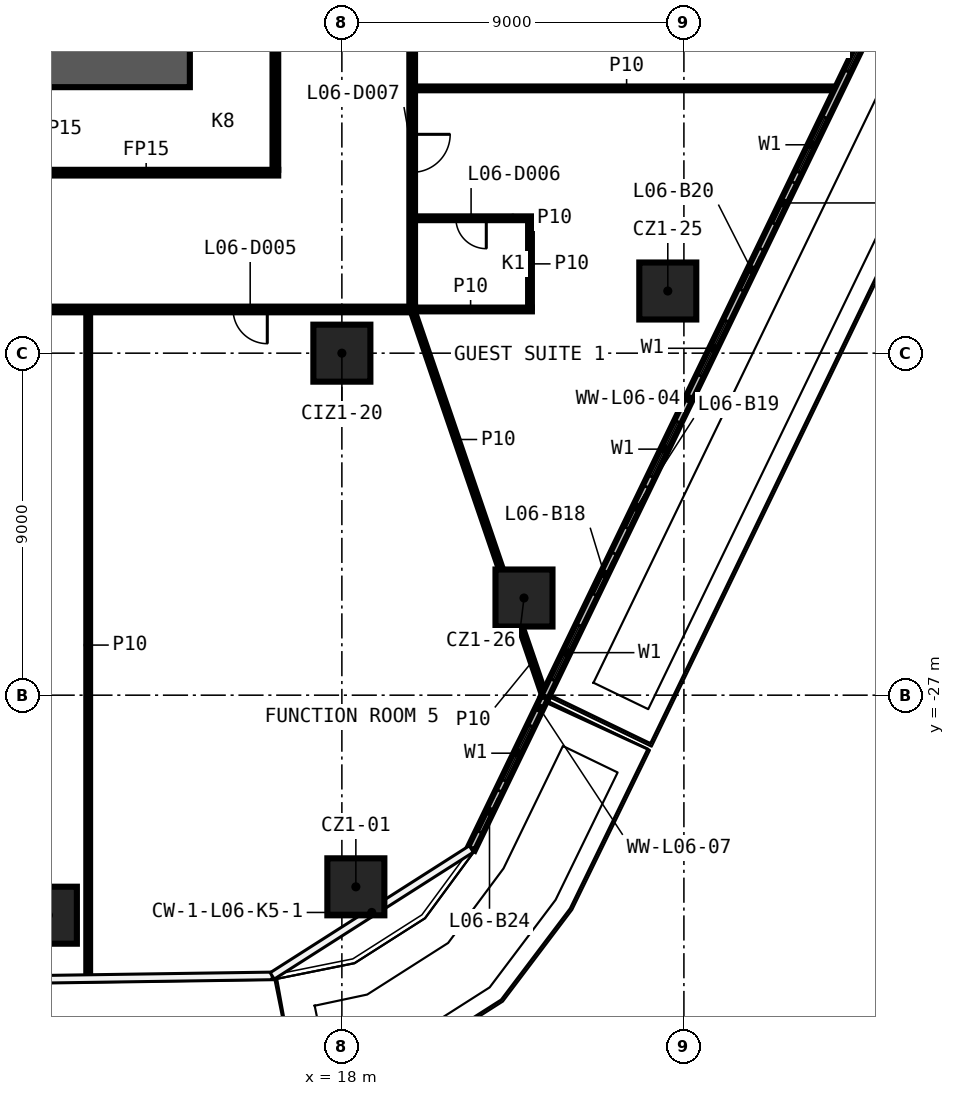
"""IFC4 building model, lengths in metres.
Left out: names, types, materials, properties, quantities, classifications, styles, units other than length and angle.
Written with IfcOpenShell. Run it as: python <this file> out.ifc"""

import sys

from ifc_helpers import new_model, si_unit, direction, frame, frame_2d, origin, origin_2d, place, context, subcontext, project, spatial, rectangle, extrude, element, fill, save


model = new_model("IFC4")
c1 = context("Model", 3, precision=1e-05, world=origin(), true_north=direction((0.0, 1.0)))
c2 = subcontext(c1, "Body", "Model", "MODEL_VIEW")
j1 = project(units=[si_unit("LENGTHUNIT", "METRE"), si_unit("PLANEANGLEUNIT", "RADIAN")], contexts=[c1])
p1 = place(None, origin())
s1 = spatial("IfcSite", under=j1, at=p1, CompositionType="ELEMENT")
p2 = place(p1, origin())
s2 = spatial("IfcBuilding", under=s1, at=p2, CompositionType="ELEMENT")
p3 = place(p2, frame((0.0, 0.0, 44.0)))
s3 = spatial("IfcBuildingStorey", under=s2, at=p3, CompositionType="ELEMENT", Elevation=44.0)
for number, where, z_axis, x_axis in (
    (1, (18.368, -32.043, 0.0), (0.0, 0.0, 1.0), (1.0, 0.0, 0.0)),
    (2, (10.277, -32.79, 0.0), (0.0, 0.0, 1.0), (1.0, 0.0, 0.0)),
    (3, (26.576, -16.364, 0.0), (0.0, 0.0, 1.0), (1.0, 0.0, 0.0)),
    (4, (22.792, -24.443, 0.0), (0.0, 0.0, 1.0), (1.0, 0.0, 0.0)),
    (5, (18.0, -18.0, 0.0), (0.0, 0.0, 1.0), (1.0, 0.0, 0.0)),
):
    element("IfcColumn", number, at=place(p3, frame(where, z_axis=z_axis, x_axis=x_axis)), inside=s3, PredefinedType="COLUMN", context=c2, shape_type="SweptSolid", body=[
        extrude(rectangle(XDim=1.5, YDim=1.5, at=origin_2d()), origin(), (0.0, 0.0, 1.0), 3.3),
    ])
p4 = place(p3, frame((19.925, -16.85, 0.0), z_axis=(0.0, 0.0, 1.0), x_axis=(-1.0, 0.0, 0.0)))
e6 = element("IfcWall", 6, at=p4, inside=s3, PredefinedType="PARTITIONING", context=c2, shape_type="SweptSolid", body=[
    extrude(rectangle(XDim=39.85, YDim=0.15, at=frame_2d((19.925, 0.0))), origin(), (0.0, 0.0, 1.0), 3.3),
])
p5 = place(p4, frame((31.008, 0.0, 0.0)))
e7 = element("IfcOpeningElement", 7, at=p5, cuts=e6, PredefinedType="OPENING", context=c2, shape_type="SweptSolid", body=[
    extrude(rectangle(XDim=0.9, YDim=2.1, at=frame_2d((0.45, 1.05))), frame((0.0, 0.085, 0.0), z_axis=(0.0, -1.0, 0.0), x_axis=(1.0, 0.0, 0.0)), (0.0, 0.0, 1.0), 0.17),
])
p6 = place(p4, frame((22.704, 0.0, 0.0)))
e8 = element("IfcOpeningElement", 8, at=p6, cuts=e6, PredefinedType="OPENING", context=c2, shape_type="SweptSolid", body=[
    extrude(rectangle(XDim=0.9, YDim=2.1, at=frame_2d((0.45, 1.05))), frame((0.0, 0.085, 0.0), z_axis=(0.0, -1.0, 0.0), x_axis=(1.0, 0.0, 0.0)), (0.0, 0.0, 1.0), 0.17),
])
p7 = place(p4, frame((3.888, 0.0, 0.0)))
e9 = element("IfcOpeningElement", 9, at=p7, cuts=e6, PredefinedType="OPENING", context=c2, shape_type="SweptSolid", body=[
    extrude(rectangle(XDim=0.9, YDim=2.1, at=frame_2d((0.45, 1.05))), frame((0.0, 0.085, 0.0), z_axis=(0.0, -1.0, 0.0), x_axis=(1.0, 0.0, 0.0)), (0.0, 0.0, 1.0), 0.17),
])
p8 = place(p3, frame((19.775, -16.85, 0.0), z_axis=(0.0, 0.0, 1.0), x_axis=(1.0, 0.0, 0.0)))
e10 = element("IfcWall", 10, at=p8, inside=s3, PredefinedType="PARTITIONING", context=c2, shape_type="SweptSolid", body=[
    extrude(rectangle(XDim=3.225, YDim=0.1, at=frame_2d((1.613, 0.0))), origin(), (0.0, 0.0, 1.0), 3.3),
])
p9 = place(p3, frame((23.0, -14.45, 0.0), z_axis=(0.0, 0.0, 1.0), x_axis=(-1.0, 0.0, 0.0)))
e11 = element("IfcWall", 11, at=p9, inside=s3, PredefinedType="PARTITIONING", context=c2, shape_type="SweptSolid", body=[
    extrude(rectangle(XDim=3.075, YDim=0.1, at=frame_2d((1.538, 0.0))), origin(), (0.0, 0.0, 1.0), 3.3),
])
p10 = place(p9, frame((1.2, 0.0, 0.0)))
e12 = element("IfcOpeningElement", 12, at=p10, cuts=e11, PredefinedType="OPENING", context=c2, shape_type="SweptSolid", body=[
    extrude(rectangle(XDim=0.8, YDim=2.1, at=frame_2d((0.4, 1.05))), frame((0.0, 0.06, 0.0), z_axis=(0.0, -1.0, 0.0), x_axis=(1.0, 0.0, 0.0)), (0.0, 0.0, 1.0), 0.12),
])
p11 = place(p3, frame((9.375, -13.25, 0.0), z_axis=(0.0, 0.0, 1.0), x_axis=(1.0, 0.0, 0.0)))
e13 = element("IfcWall", 13, at=p11, inside=s3, PredefinedType="PARTITIONING", context=c2, shape_type="SweptSolid", body=[
    extrude(rectangle(XDim=6.95, YDim=0.15, at=frame_2d((3.475, 0.0))), origin(), (0.0, 0.0, 1.0), 3.3),
])
p12 = place(p3, frame((19.925, -11.032, 0.0), z_axis=(0.0, 0.0, 1.0), x_axis=(1.0, 0.0, 0.0)))
e14 = element("IfcWall", 14, at=p12, inside=s3, PredefinedType="PARTITIONING", context=c2, shape_type="SweptSolid", body=[
    extrude(rectangle(XDim=11.135, YDim=0.1, at=frame_2d((5.567, 0.0))), origin(), (0.0, 0.0, 1.0), 3.3),
])
p13 = place(p3, frame((22.95, -16.8, 0.0), z_axis=(0.0, 0.0, 1.0), x_axis=(0.0, 1.0, 0.0)))
e15 = element("IfcWall", 15, at=p13, inside=s3, PredefinedType="PARTITIONING", context=c2, shape_type="SweptSolid", body=[
    extrude(rectangle(XDim=2.3, YDim=0.1, at=frame_2d((1.15, 0.0))), origin(), (0.0, 0.0, 1.0), 3.3),
])
p14 = place(p3, frame((19.85, 16.775, 0.0), z_axis=(0.0, 0.0, 1.0), x_axis=(0.0, -1.0, 0.0)))
e16 = element("IfcWall", 16, at=p14, inside=s3, PredefinedType="PARTITIONING", context=c2, shape_type="SweptSolid", body=[
    extrude(rectangle(XDim=33.55, YDim=0.15, at=frame_2d((16.775, 0.0))), origin(), (0.0, 0.0, 1.0), 3.3),
])
p15 = place(p14, frame((29.016, 0.0, 0.0)))
e17 = element("IfcOpeningElement", 17, at=p15, cuts=e16, PredefinedType="OPENING", context=c2, shape_type="SweptSolid", body=[
    extrude(rectangle(XDim=1.0, YDim=2.1, at=frame_2d((0.5, 1.05))), frame((0.0, 0.085, 0.0), z_axis=(0.0, -1.0, 0.0), x_axis=(1.0, 0.0, 0.0)), (0.0, 0.0, 1.0), 0.17),
])
p16 = place(p14, frame((20.1, 0.0, 0.0)))
e18 = element("IfcOpeningElement", 18, at=p16, cuts=e16, PredefinedType="OPENING", context=c2, shape_type="SweptSolid", body=[
    extrude(rectangle(XDim=1.0, YDim=2.1, at=frame_2d((0.5, 1.05))), frame((0.0, 0.085, 0.0), z_axis=(0.0, -1.0, 0.0), x_axis=(1.0, 0.0, 0.0)), (0.0, 0.0, 1.0), 0.17),
])
p17 = place(p14, frame((18.446, 0.0, 0.0)))
e19 = element("IfcOpeningElement", 19, at=p17, cuts=e16, PredefinedType="OPENING", context=c2, shape_type="SweptSolid", body=[
    extrude(rectangle(XDim=1.0, YDim=2.1, at=frame_2d((0.5, 1.05))), frame((0.0, 0.085, 0.0), z_axis=(0.0, -1.0, 0.0), x_axis=(1.0, 0.0, 0.0)), (0.0, 0.0, 1.0), 0.17),
])
p18 = place(p14, frame((4.143, 0.0, 0.0)))
e20 = element("IfcOpeningElement", 20, at=p18, cuts=e16, PredefinedType="OPENING", context=c2, shape_type="SweptSolid", body=[
    extrude(rectangle(XDim=0.9, YDim=2.1, at=frame_2d((0.45, 1.05))), frame((0.0, 0.085, 0.0), z_axis=(0.0, -1.0, 0.0), x_axis=(1.0, 0.0, 0.0)), (0.0, 0.0, 1.0), 0.17),
])
p19 = place(p3, frame((16.25, -13.175, 0.0), z_axis=(0.0, 0.0, 1.0), x_axis=(0.0, 1.0, 0.0)))
e21 = element("IfcWall", 21, at=p19, inside=s3, PredefinedType="PARTITIONING", context=c2, shape_type="SweptSolid", body=[
    extrude(rectangle(XDim=26.35, YDim=0.15, at=frame_2d((13.175, 0.0))), origin(), (0.0, 0.0, 1.0), 3.3),
])
p20 = place(p19, frame((8.225, 0.0, 0.0)))
e22 = element("IfcOpeningElement", 22, at=p20, cuts=e21, PredefinedType="OPENING", context=c2, shape_type="SweptSolid", body=[
    extrude(rectangle(XDim=0.9, YDim=2.1, at=frame_2d((0.45, 1.05))), frame((0.0, 0.085, 0.0), z_axis=(0.0, -1.0, 0.0), x_axis=(1.0, 0.0, 0.0)), (0.0, 0.0, 1.0), 0.17),
])
p21 = place(p19, frame((17.225, 0.0, 0.0)))
e23 = element("IfcOpeningElement", 23, at=p21, cuts=e21, PredefinedType="OPENING", context=c2, shape_type="SweptSolid", body=[
    extrude(rectangle(XDim=0.9, YDim=2.1, at=frame_2d((0.45, 1.05))), frame((0.0, 0.085, 0.0), z_axis=(0.0, -1.0, 0.0), x_axis=(1.0, 0.0, 0.0)), (0.0, 0.0, 1.0), 0.17),
])
p22 = place(p3, frame((11.325, -34.438, 0.0), z_axis=(0.0, 0.0, 1.0), x_axis=(0.0, 1.0, 0.0)))
e24 = element("IfcWall", 24, at=p22, inside=s3, PredefinedType="PARTITIONING", context=c2, shape_type="SweptSolid", body=[
    extrude(rectangle(XDim=17.513, YDim=0.1, at=frame_2d((8.757, 0.0))), origin(), (0.0, 0.0, 1.0), 3.3),
])
p23 = place(p3, frame((19.85, -16.85, 0.0), z_axis=(0.0, 0.0, 1.0), x_axis=(0.323389409091, -0.94626597217, 0.0)))
e25 = element("IfcWall", 25, at=p23, inside=s3, PredefinedType="PARTITIONING", context=c2, shape_type="SweptSolid", body=[
    extrude(rectangle(XDim=7.232, YDim=0.1, at=frame_2d((3.616, 0.0))), origin(), (0.0, 0.0, 1.0), 3.3),
])
p24 = place(p3, frame((22.701, -25.193, 0.0), z_axis=(0.0, 0.0, 1.0), x_axis=(0.323521274284, -0.94622089656, 0.0)))
e26 = element("IfcWall", 26, at=p24, inside=s3, PredefinedType="PARTITIONING", context=c2, shape_type="SweptSolid", body=[
    extrude(rectangle(XDim=1.936, YDim=0.1, at=frame_2d((0.968, 0.0))), origin(), (0.0, 0.0, 1.0), 3.3),
])
p25 = place(p3, frame((23.338, -27.051, 0.0), z_axis=(0.0, 0.0, 1.0), x_axis=(0.43524886879, 0.900310181114, 0.0)))
e27 = element("IfcWall", 27, at=p25, inside=s3, PredefinedType="SOLIDWALL", context=c2, shape_type="SweptSolid", body=[
    extrude(rectangle(XDim=26.689, YDim=0.2, at=frame_2d((13.344, 0.0))), origin(), (0.0, 0.0, 1.0), 3.3),
])
p26 = place(p25, frame((0.5, 0.0, 0.6)))
e28 = element("IfcOpeningElement", 28, at=p26, cuts=e27, PredefinedType="OPENING", context=c2, shape_type="SweptSolid", body=[
    extrude(rectangle(XDim=1.6, YDim=2.4, at=frame_2d((0.8, 1.2))), frame((0.0, 0.11, 0.0), z_axis=(0.0, -1.0, 0.0), x_axis=(1.0, 0.0, 0.0)), (0.0, 0.0, 1.0), 0.22),
])
p27 = place(p25, frame((3.0, 0.0, 0.0)))
e29 = element("IfcOpeningElement", 29, at=p27, cuts=e27, PredefinedType="OPENING", context=c2, shape_type="SweptSolid", body=[
    extrude(rectangle(XDim=1.2, YDim=2.4, at=frame_2d((0.6, 1.2))), frame((0.0, 0.11, 0.0), z_axis=(0.0, -1.0, 0.0), x_axis=(1.0, 0.0, 0.0)), (0.0, 0.0, 1.0), 0.22),
])
p28 = place(p25, frame((6.448, 0.0, 0.6)))
e30 = element("IfcOpeningElement", 30, at=p28, cuts=e27, PredefinedType="OPENING", context=c2, shape_type="SweptSolid", body=[
    extrude(rectangle(XDim=1.6, YDim=2.4, at=frame_2d((0.8, 1.2))), frame((0.0, 0.11, 0.0), z_axis=(0.0, -1.0, 0.0), x_axis=(1.0, 0.0, 0.0)), (0.0, 0.0, 1.0), 0.22),
])
p29 = place(p25, frame((4.948, 0.0, 0.0)))
e31 = element("IfcOpeningElement", 31, at=p29, cuts=e27, PredefinedType="OPENING", context=c2, shape_type="SweptSolid", body=[
    extrude(rectangle(XDim=1.2, YDim=2.4, at=frame_2d((0.6, 1.2))), frame((0.0, 0.11, 0.0), z_axis=(0.0, -1.0, 0.0), x_axis=(1.0, 0.0, 0.0)), (0.0, 0.0, 1.0), 0.22),
])
p30 = place(p25, frame((9.396, 0.0, 0.6)))
e32 = element("IfcOpeningElement", 32, at=p30, cuts=e27, PredefinedType="OPENING", context=c2, shape_type="SweptSolid", body=[
    extrude(rectangle(XDim=1.6, YDim=2.4, at=frame_2d((0.8, 1.2))), frame((0.0, 0.11, 0.0), z_axis=(0.0, -1.0, 0.0), x_axis=(1.0, 0.0, 0.0)), (0.0, 0.0, 1.0), 0.22),
])
p31 = place(p25, frame((11.896, 0.0, 0.0)))
e33 = element("IfcOpeningElement", 33, at=p31, cuts=e27, PredefinedType="OPENING", context=c2, shape_type="SweptSolid", body=[
    extrude(rectangle(XDim=1.2, YDim=2.4, at=frame_2d((0.6, 1.2))), frame((0.0, 0.11, 0.0), z_axis=(0.0, -1.0, 0.0), x_axis=(1.0, 0.0, 0.0)), (0.0, 0.0, 1.0), 0.22),
])
p32 = place(p25, frame((15.344, 0.0, 0.6)))
e34 = element("IfcOpeningElement", 34, at=p32, cuts=e27, PredefinedType="OPENING", context=c2, shape_type="SweptSolid", body=[
    extrude(rectangle(XDim=1.6, YDim=2.4, at=frame_2d((0.8, 1.2))), frame((0.0, 0.11, 0.0), z_axis=(0.0, -1.0, 0.0), x_axis=(1.0, 0.0, 0.0)), (0.0, 0.0, 1.0), 0.22),
])
p33 = place(p25, frame((13.844, 0.0, 0.0)))
e35 = element("IfcOpeningElement", 35, at=p33, cuts=e27, PredefinedType="OPENING", context=c2, shape_type="SweptSolid", body=[
    extrude(rectangle(XDim=1.2, YDim=2.4, at=frame_2d((0.6, 1.2))), frame((0.0, 0.11, 0.0), z_axis=(0.0, -1.0, 0.0), x_axis=(1.0, 0.0, 0.0)), (0.0, 0.0, 1.0), 0.22),
])
p34 = place(p25, frame((18.292, 0.0, 0.6)))
e36 = element("IfcOpeningElement", 36, at=p34, cuts=e27, PredefinedType="OPENING", context=c2, shape_type="SweptSolid", body=[
    extrude(rectangle(XDim=1.6, YDim=2.4, at=frame_2d((0.8, 1.2))), frame((0.0, 0.11, 0.0), z_axis=(0.0, -1.0, 0.0), x_axis=(1.0, 0.0, 0.0)), (0.0, 0.0, 1.0), 0.22),
])
p35 = place(p25, frame((20.692, 0.0, 0.0)))
e37 = element("IfcOpeningElement", 37, at=p35, cuts=e27, PredefinedType="OPENING", context=c2, shape_type="SweptSolid", body=[
    extrude(rectangle(XDim=1.2, YDim=2.4, at=frame_2d((0.6, 1.2))), frame((0.0, 0.11, 0.0), z_axis=(0.0, -1.0, 0.0), x_axis=(1.0, 0.0, 0.0)), (0.0, 0.0, 1.0), 0.22),
])
p36 = place(p25, frame((24.24, 0.0, 0.6)))
e38 = element("IfcOpeningElement", 38, at=p36, cuts=e27, PredefinedType="OPENING", context=c2, shape_type="SweptSolid", body=[
    extrude(rectangle(XDim=1.6, YDim=2.4, at=frame_2d((0.8, 1.2))), frame((0.0, 0.11, 0.0), z_axis=(0.0, -1.0, 0.0), x_axis=(1.0, 0.0, 0.0)), (0.0, 0.0, 1.0), 0.22),
])
p37 = place(p25, frame((22.74, 0.0, 0.0)))
e39 = element("IfcOpeningElement", 39, at=p37, cuts=e27, PredefinedType="OPENING", context=c2, shape_type="SweptSolid", body=[
    extrude(rectangle(XDim=1.2, YDim=2.4, at=frame_2d((0.6, 1.2))), frame((0.0, 0.11, 0.0), z_axis=(0.0, -1.0, 0.0), x_axis=(1.0, 0.0, 0.0)), (0.0, 0.0, 1.0), 0.22),
])
p38 = place(p3, frame((21.406, -31.048, 0.0), z_axis=(0.0, 0.0, 1.0), x_axis=(0.435227364278, 0.900320577008, 0.0)))
e40 = element("IfcWall", 40, at=p38, inside=s3, PredefinedType="SOLIDWALL", context=c2, shape_type="SweptSolid", body=[
    extrude(rectangle(XDim=4.439, YDim=0.2, at=frame_2d((2.219, 0.0))), origin(), (0.0, 0.0, 1.0), 3.3),
])
p39 = place(p38, frame((2.0, 0.0, 0.6)))
e41 = element("IfcOpeningElement", 41, at=p39, cuts=e40, PredefinedType="OPENING", context=c2, shape_type="SweptSolid", body=[
    extrude(rectangle(XDim=1.6, YDim=2.4, at=frame_2d((0.8, 1.2))), frame((0.0, 0.11, 0.0), z_axis=(0.0, -1.0, 0.0), x_axis=(1.0, 0.0, 0.0)), (0.0, 0.0, 1.0), 0.22),
])
p40 = place(p38, frame((0.5, 0.0, 0.0)))
e42 = element("IfcOpeningElement", 42, at=p40, cuts=e40, PredefinedType="OPENING", context=c2, shape_type="SweptSolid", body=[
    extrude(rectangle(XDim=1.2, YDim=2.4, at=frame_2d((0.6, 1.2))), frame((0.0, 0.11, 0.0), z_axis=(0.0, -1.0, 0.0), x_axis=(1.0, 0.0, 0.0)), (0.0, 0.0, 1.0), 0.22),
])
p41 = place(p3, frame((14.0, -10.4, 0.0), z_axis=(0.0, 0.0, 1.0), x_axis=(-1.0, 0.0, 0.0)))
e43 = element("IfcWall", 43, at=p41, inside=s3, PredefinedType="SHEAR", context=c2, shape_type="SweptSolid", body=[
    extrude(rectangle(XDim=28.0, YDim=1.2, at=frame_2d((14.0, 0.0))), origin(), (0.0, 0.0, 1.0), 3.3),
])
p42 = place(p41, frame((5.1, 0.0, 0.0)))
e44 = element("IfcOpeningElement", 44, at=p42, cuts=e43, PredefinedType="OPENING", context=c2, shape_type="SweptSolid", body=[
    extrude(rectangle(XDim=1.6, YDim=2.1, at=frame_2d((0.8, 1.05))), frame((0.0, 0.61, 0.0), z_axis=(0.0, -1.0, 0.0), x_axis=(1.0, 0.0, 0.0)), (0.0, 0.0, 1.0), 1.22),
])
p43 = place(p7, origin())
e45 = element("IfcDoor", 45, at=p43, inside=s3, OperationType="SINGLE_SWING_LEFT", PredefinedType="DOOR", context=c2, shape_type="SweptSolid", body=[
    extrude(rectangle(XDim=0.9, YDim=2.1, at=frame_2d((0.45, 1.05))), frame((0.0, 0.025, 0.0), z_axis=(0.0, -1.0, 0.0), x_axis=(1.0, 0.0, 0.0)), (0.0, 0.0, 1.0), 0.05),
])
fill(e9, e45)
p44 = place(p10, origin())
e46 = element("IfcDoor", 46, at=p44, inside=s3, OperationType="SINGLE_SWING_LEFT", PredefinedType="DOOR", context=c2, shape_type="SweptSolid", body=[
    extrude(rectangle(XDim=0.8, YDim=2.1, at=frame_2d((0.4, 1.05))), frame((0.0, 0.025, 0.0), z_axis=(0.0, -1.0, 0.0), x_axis=(1.0, 0.0, 0.0)), (0.0, 0.0, 1.0), 0.05),
])
fill(e12, e46)
p45 = place(p15, origin())
e47 = element("IfcDoor", 47, at=p45, inside=s3, OperationType="SINGLE_SWING_RIGHT", PredefinedType="DOOR", context=c2, shape_type="SweptSolid", body=[
    extrude(rectangle(XDim=1.0, YDim=2.1, at=frame_2d((0.5, 1.05))), frame((0.0, 0.025, 0.0), z_axis=(0.0, -1.0, 0.0), x_axis=(1.0, 0.0, 0.0)), (0.0, 0.0, 1.0), 0.05),
])
fill(e17, e47)
p46 = place(p26, origin())
e48 = element("IfcWindow", 48, at=p46, inside=s3, PartitioningType="SINGLE_PANEL", PredefinedType="WINDOW", context=c2, shape_type="SweptSolid", body=[
    extrude(rectangle(XDim=1.6, YDim=2.4, at=frame_2d((0.8, 1.2))), frame((0.0, 0.03, 0.0), z_axis=(0.0, -1.0, 0.0), x_axis=(1.0, 0.0, 0.0)), (0.0, 0.0, 1.0), 0.06),
])
fill(e28, e48)
p47 = place(p27, origin())
e49 = element("IfcDoor", 49, at=p47, inside=s3, OperationType="SLIDING_TO_LEFT", PredefinedType="DOOR", context=c2, shape_type="SweptSolid", body=[
    extrude(rectangle(XDim=1.2, YDim=2.4, at=frame_2d((0.6, 1.2))), frame((0.0, 0.025, 0.0), z_axis=(0.0, -1.0, 0.0), x_axis=(1.0, 0.0, 0.0)), (0.0, 0.0, 1.0), 0.05),
])
fill(e29, e49)
p48 = place(p28, origin())
e50 = element("IfcWindow", 50, at=p48, inside=s3, PartitioningType="SINGLE_PANEL", PredefinedType="WINDOW", context=c2, shape_type="SweptSolid", body=[
    extrude(rectangle(XDim=1.6, YDim=2.4, at=frame_2d((0.8, 1.2))), frame((0.0, 0.03, 0.0), z_axis=(0.0, -1.0, 0.0), x_axis=(1.0, 0.0, 0.0)), (0.0, 0.0, 1.0), 0.06),
])
fill(e30, e50)
p49 = place(p29, origin())
e51 = element("IfcDoor", 51, at=p49, inside=s3, OperationType="SLIDING_TO_LEFT", PredefinedType="DOOR", context=c2, shape_type="SweptSolid", body=[
    extrude(rectangle(XDim=1.2, YDim=2.4, at=frame_2d((0.6, 1.2))), frame((0.0, 0.025, 0.0), z_axis=(0.0, -1.0, 0.0), x_axis=(1.0, 0.0, 0.0)), (0.0, 0.0, 1.0), 0.05),
])
fill(e31, e51)
p50 = place(p30, origin())
e52 = element("IfcWindow", 52, at=p50, inside=s3, PartitioningType="SINGLE_PANEL", PredefinedType="WINDOW", context=c2, shape_type="SweptSolid", body=[
    extrude(rectangle(XDim=1.6, YDim=2.4, at=frame_2d((0.8, 1.2))), frame((0.0, 0.03, 0.0), z_axis=(0.0, -1.0, 0.0), x_axis=(1.0, 0.0, 0.0)), (0.0, 0.0, 1.0), 0.06),
])
fill(e32, e52)
p51 = place(p31, origin())
e53 = element("IfcDoor", 53, at=p51, inside=s3, OperationType="SLIDING_TO_LEFT", PredefinedType="DOOR", context=c2, shape_type="SweptSolid", body=[
    extrude(rectangle(XDim=1.2, YDim=2.4, at=frame_2d((0.6, 1.2))), frame((0.0, 0.025, 0.0), z_axis=(0.0, -1.0, 0.0), x_axis=(1.0, 0.0, 0.0)), (0.0, 0.0, 1.0), 0.05),
])
fill(e33, e53)
p52 = place(p32, origin())
e54 = element("IfcWindow", 54, at=p52, inside=s3, PartitioningType="SINGLE_PANEL", PredefinedType="WINDOW", context=c2, shape_type="SweptSolid", body=[
    extrude(rectangle(XDim=1.6, YDim=2.4, at=frame_2d((0.8, 1.2))), frame((0.0, 0.03, 0.0), z_axis=(0.0, -1.0, 0.0), x_axis=(1.0, 0.0, 0.0)), (0.0, 0.0, 1.0), 0.06),
])
fill(e34, e54)
p53 = place(p33, origin())
e55 = element("IfcDoor", 55, at=p53, inside=s3, OperationType="SLIDING_TO_LEFT", PredefinedType="DOOR", context=c2, shape_type="SweptSolid", body=[
    extrude(rectangle(XDim=1.2, YDim=2.4, at=frame_2d((0.6, 1.2))), frame((0.0, 0.025, 0.0), z_axis=(0.0, -1.0, 0.0), x_axis=(1.0, 0.0, 0.0)), (0.0, 0.0, 1.0), 0.05),
])
fill(e35, e55)
p54 = place(p34, origin())
e56 = element("IfcWindow", 56, at=p54, inside=s3, PartitioningType="SINGLE_PANEL", PredefinedType="WINDOW", context=c2, shape_type="SweptSolid", body=[
    extrude(rectangle(XDim=1.6, YDim=2.4, at=frame_2d((0.8, 1.2))), frame((0.0, 0.03, 0.0), z_axis=(0.0, -1.0, 0.0), x_axis=(1.0, 0.0, 0.0)), (0.0, 0.0, 1.0), 0.06),
])
fill(e36, e56)
p55 = place(p39, origin())
e57 = element("IfcWindow", 57, at=p55, inside=s3, PartitioningType="SINGLE_PANEL", PredefinedType="WINDOW", context=c2, shape_type="SweptSolid", body=[
    extrude(rectangle(XDim=1.6, YDim=2.4, at=frame_2d((0.8, 1.2))), frame((0.0, 0.03, 0.0), z_axis=(0.0, -1.0, 0.0), x_axis=(1.0, 0.0, 0.0)), (0.0, 0.0, 1.0), 0.06),
])
fill(e41, e57)
p56 = place(p40, origin())
e58 = element("IfcDoor", 58, at=p56, inside=s3, OperationType="SLIDING_TO_LEFT", PredefinedType="DOOR", context=c2, shape_type="SweptSolid", body=[
    extrude(rectangle(XDim=1.2, YDim=2.4, at=frame_2d((0.6, 1.2))), frame((0.0, 0.025, 0.0), z_axis=(0.0, -1.0, 0.0), x_axis=(1.0, 0.0, 0.0)), (0.0, 0.0, 1.0), 0.05),
])
fill(e42, e58)
save(model, sys.argv[1])
